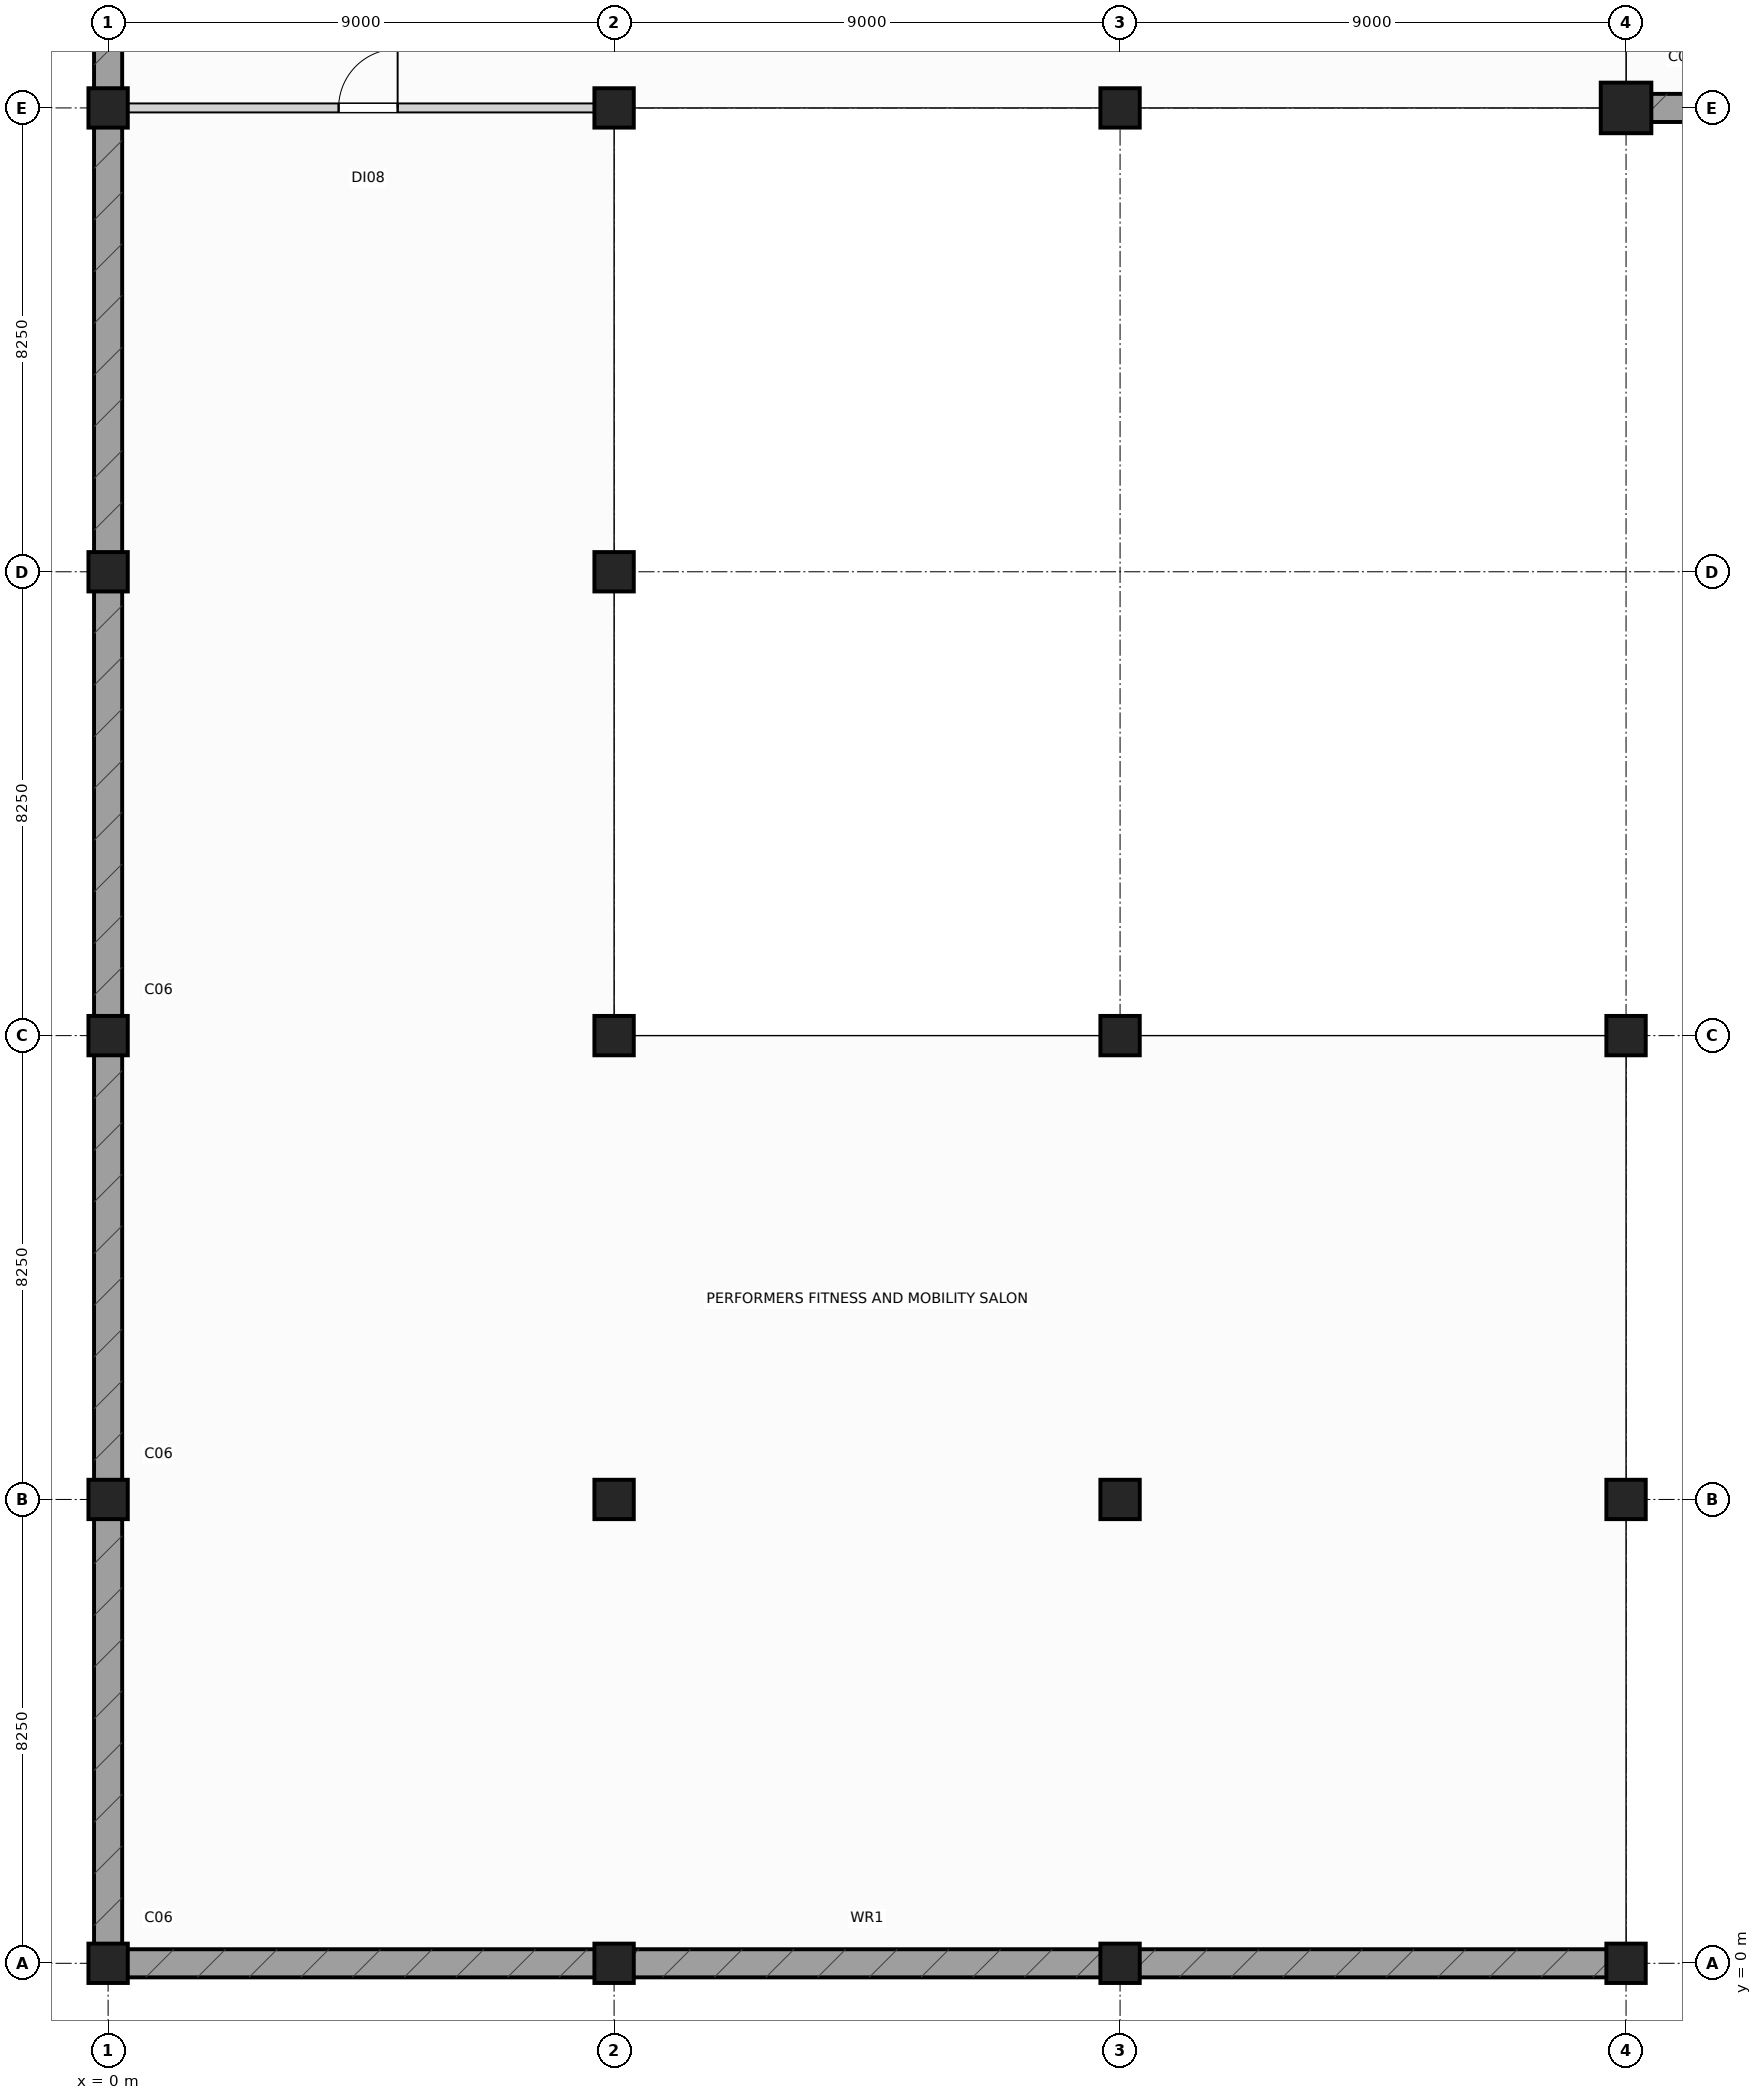
"""IFC4 building model, lengths in metres.
Left out: names, types, materials, properties, quantities, classifications, styles, units other than length and angle.
Written with IfcOpenShell. Run it as: python <this file> out.ifc"""

import sys

from ifc_helpers import new_model, si_unit, direction, frame, frame_2d, origin, origin_with_axes, origin_2d, place, context, subcontext, project, spatial, rectangle, hollow_circle, extrude, element, fill, save


model = new_model("IFC4")
c1 = context("Model", 3, precision=1e-05, world=origin(), true_north=direction((0.0, 1.0)))
c2 = subcontext(c1, "Body", "Model", "MODEL_VIEW")
j1 = project(units=[si_unit("LENGTHUNIT", "METRE"), si_unit("PLANEANGLEUNIT", "RADIAN")], contexts=[c1])
p1 = place(None, origin())
s1 = spatial("IfcSite", under=j1, at=p1, CompositionType="ELEMENT")
p2 = place(p1, origin())
s2 = spatial("IfcBuilding", under=s1, at=p2, CompositionType="ELEMENT")
p3 = place(p2, frame((0.0, 0.0, -5.4)))
s3 = spatial("IfcBuildingStorey", under=s2, at=p3, CompositionType="ELEMENT", Elevation=-5.4)
for number, where, z_axis, x_axis in (
    (1, (0.0, 0.0, 0.0), (0.0, 0.0, 1.0), (1.0, 0.0, 0.0)),
    (2, (0.0, 8.25, 0.0), (0.0, 0.0, 1.0), (1.0, 0.0, 0.0)),
    (3, (0.0, 16.5, 0.0), (0.0, 0.0, 1.0), (1.0, 0.0, 0.0)),
    (4, (0.0, 24.75, 0.0), (0.0, 0.0, 1.0), (1.0, 0.0, 0.0)),
    (5, (0.0, 33.0, 0.0), (0.0, 0.0, 1.0), (1.0, 0.0, 0.0)),
    (6, (9.0, 0.0, 0.0), (0.0, 0.0, 1.0), (1.0, 0.0, 0.0)),
    (7, (9.0, 8.25, 0.0), (0.0, 0.0, 1.0), (1.0, 0.0, 0.0)),
    (8, (9.0, 16.5, 0.0), (0.0, 0.0, 1.0), (1.0, 0.0, 0.0)),
    (9, (9.0, 24.75, 0.0), (0.0, 0.0, 1.0), (1.0, 0.0, 0.0)),
    (10, (9.0, 33.0, 0.0), (0.0, 0.0, 1.0), (1.0, 0.0, 0.0)),
    (11, (18.0, 0.0, 0.0), (0.0, 0.0, 1.0), (1.0, 0.0, 0.0)),
    (12, (18.0, 8.25, 0.0), (0.0, 0.0, 1.0), (1.0, 0.0, 0.0)),
    (13, (18.0, 16.5, 0.0), (0.0, 0.0, 1.0), (1.0, 0.0, 0.0)),
    (14, (18.0, 33.0, 0.0), (0.0, 0.0, 1.0), (1.0, 0.0, 0.0)),
    (15, (27.0, 0.0, 0.0), (0.0, 0.0, 1.0), (1.0, 0.0, 0.0)),
    (16, (27.0, 8.25, 0.0), (0.0, 0.0, 1.0), (1.0, 0.0, 0.0)),
    (17, (27.0, 16.5, 0.0), (0.0, 0.0, 1.0), (1.0, 0.0, 0.0)),
):
    element("IfcColumn", number, at=place(p3, frame(where, z_axis=z_axis, x_axis=x_axis)), inside=s3, PredefinedType="COLUMN", context=c2, shape_type="SweptSolid", body=[
        extrude(rectangle(XDim=0.7, YDim=0.7, at=origin_2d()), origin(), (0.0, 0.0, 1.0), 5.4),
    ])
p4 = place(p3, frame((27.0, 33.0, 0.0), z_axis=(0.0, 0.0, 1.0), x_axis=(1.0, 0.0, 0.0)))
e18 = element("IfcColumn", 18, at=p4, inside=s3, PredefinedType="COLUMN", context=c2, shape_type="SweptSolid", body=[
    extrude(rectangle(XDim=0.9, YDim=0.9, at=origin_2d()), origin(), (0.0, 0.0, 1.0), 5.4),
])
p5 = place(p3, origin_with_axes())
e19 = element("IfcWall", 19, at=p5, inside=s3, PredefinedType="USERDEFINED", context=c2, shape_type="SweptSolid", body=[
    extrude(rectangle(XDim=27.0, YDim=0.5, at=frame_2d((13.5, 0.0))), origin(), (0.0, 0.0, 1.0), 5.08),
])
p6 = place(p3, frame((0.0, 0.0, 0.0), z_axis=(0.0, 0.0, 1.0), x_axis=(0.0, 1.0, 0.0)))
e20 = element("IfcWall", 20, at=p6, inside=s3, PredefinedType="USERDEFINED", context=c2, shape_type="SweptSolid", body=[
    extrude(rectangle(XDim=120.0, YDim=0.5, at=frame_2d((60.0, 0.0))), origin(), (0.0, 0.0, 1.0), 5.08),
])
p7 = place(p3, frame((27.0, 33.0, 0.0), z_axis=(0.0, 0.0, 1.0), x_axis=(1.0, 0.0, 0.0)))
e21 = element("IfcWall", 21, at=p7, inside=s3, PredefinedType="USERDEFINED", context=c2, shape_type="SweptSolid", body=[
    extrude(rectangle(XDim=54.0, YDim=0.5, at=frame_2d((27.0, 0.0))), origin(), (0.0, 0.0, 1.0), 5.08),
])
p8 = place(p3, frame((33.8, 39.8, 0.0), z_axis=(-0.371927502201, -0.371927502201, 0.850493895459), x_axis=(0.707106781187, -0.707106781187, 0.0)))
e22 = element("IfcColumn", 22, at=p8, inside=s3, PredefinedType="COLUMN", context=c2, shape_type="SweptSolid", body=[
    extrude(hollow_circle(Radius=0.254, WallThickness=0.025, at=origin_2d()), origin(), (0.0, 0.0, 1.0), 18.283),
])
p9 = place(p3, frame((0.25, 33.0, 0.0), z_axis=(0.0, 0.0, 1.0), x_axis=(1.0, 0.0, 0.0)))
e23 = element("IfcWall", 23, at=p9, inside=s3, PredefinedType="PARTITIONING", context=c2, shape_type="SweptSolid", body=[
    extrude(rectangle(XDim=8.75, YDim=0.16, at=frame_2d((4.375, 0.0))), origin(), (0.0, 0.0, 1.0), 4.295),
])
p10 = place(p9, frame((3.85, 0.0, 0.0)))
e24 = element("IfcOpeningElement", 24, at=p10, cuts=e23, PredefinedType="OPENING", context=c2, shape_type="SweptSolid", body=[
    extrude(rectangle(XDim=1.05, YDim=2.12, at=frame_2d((0.525, 1.06))), frame((0.0, 0.09, 0.0), z_axis=(0.0, -1.0, 0.0), x_axis=(1.0, 0.0, 0.0)), (0.0, 0.0, 1.0), 0.18),
])
p11 = place(p10, origin())
e25 = element("IfcDoor", 25, at=p11, inside=s3, OperationType="SINGLE_SWING_RIGHT", PredefinedType="DOOR", context=c2, shape_type="SweptSolid", body=[
    extrude(rectangle(XDim=1.05, YDim=2.12, at=frame_2d((0.525, 1.06))), frame((0.0, 0.025, 0.0), z_axis=(0.0, -1.0, 0.0), x_axis=(1.0, 0.0, 0.0)), (0.0, 0.0, 1.0), 0.05),
])
fill(e24, e25)
save(model, sys.argv[1])
